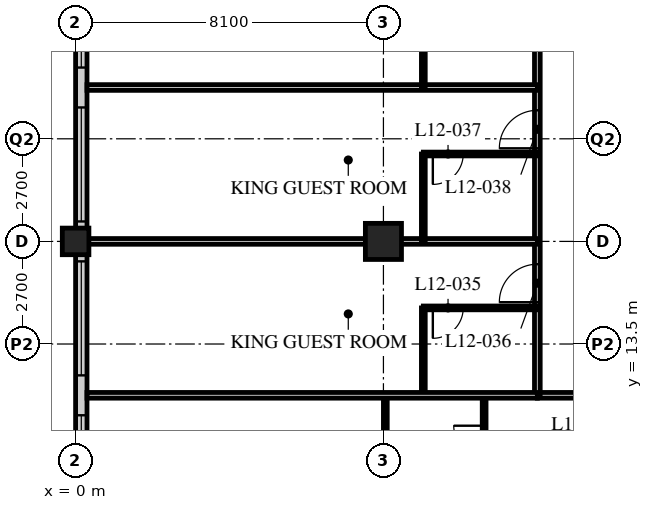
"""IFC4 building model, lengths in metres.
Left out: names, types, materials, properties, quantities, classifications, styles, units other than length and angle.
Written with IfcOpenShell. Run it as: python <this file> out.ifc"""

import sys

from ifc_helpers import new_model, si_unit, direction, frame, frame_2d, origin, origin_2d, place, context, subcontext, project, spatial, rectangle, hollow_rectangle, extrude, element, fill, save


model = new_model("IFC4")
c1 = context("Model", 3, precision=1e-05, world=origin(), true_north=direction((0.0, 1.0)))
c2 = subcontext(c1, "Body", "Model", "MODEL_VIEW")
j1 = project(units=[si_unit("LENGTHUNIT", "METRE"), si_unit("PLANEANGLEUNIT", "RADIAN")], contexts=[c1])
p1 = place(None, origin())
s1 = spatial("IfcSite", under=j1, at=p1, CompositionType="ELEMENT")
p2 = place(p1, origin())
s2 = spatial("IfcBuilding", under=s1, at=p2, CompositionType="ELEMENT")
p3 = place(p2, frame((0.0, 0.0, 53.4)))
s3 = spatial("IfcBuildingStorey", under=s2, at=p3, CompositionType="ELEMENT", Elevation=53.4)
p4 = place(p3, frame((0.0, 16.2, 0.0), z_axis=(0.0, 0.0, 1.0), x_axis=(1.0, 0.0, 0.0)))
e1 = element("IfcColumn", 1, at=p4, inside=s3, PredefinedType="COLUMN", context=c2, shape_type="SweptSolid", body=[
    extrude(hollow_rectangle(XDim=0.7, YDim=0.7, WallThickness=0.06, at=origin_2d()), origin(), (0.0, 0.0, 1.0), 3.4),
])
p5 = place(p3, frame((8.1, 16.2, 0.0), z_axis=(0.0, 0.0, 1.0), x_axis=(1.0, 0.0, 0.0)))
e2 = element("IfcColumn", 2, at=p5, inside=s3, PredefinedType="COLUMN", context=c2, shape_type="SweptSolid", body=[
    extrude(hollow_rectangle(XDim=0.95, YDim=0.95, WallThickness=0.095, at=origin_2d()), origin(), (0.0, 0.0, 1.0), 3.4),
])
p6 = place(p3, frame((0.15, 40.2, 0.0), z_axis=(0.0, 0.0, 1.0), x_axis=(0.0, -1.0, 0.0)))
e3 = element("IfcWall", 3, at=p6, inside=s3, PredefinedType="SOLIDWALL", context=c2, shape_type="SweptSolid", body=[
    extrude(rectangle(XDim=32.1, YDim=0.3, at=frame_2d((16.05, 0.0))), origin(), (0.0, 0.0, 1.0), 3.19),
])
p7 = place(p6, frame((0.225, 0.0, 0.9)))
e4 = element("IfcOpeningElement", 4, at=p7, cuts=e3, PredefinedType="OPENING", context=c2, shape_type="SweptSolid", body=[
    extrude(rectangle(XDim=3.0, YDim=2.0, at=frame_2d((1.5, 1.0))), frame((0.0, 0.16, 0.0), z_axis=(0.0, -1.0, 0.0), x_axis=(1.0, 0.0, 0.0)), (0.0, 0.0, 1.0), 0.32),
])
p8 = place(p6, frame((4.275, 0.0, 0.9)))
e5 = element("IfcOpeningElement", 5, at=p8, cuts=e3, PredefinedType="OPENING", context=c2, shape_type="SweptSolid", body=[
    extrude(rectangle(XDim=3.0, YDim=2.0, at=frame_2d((1.5, 1.0))), frame((0.0, 0.16, 0.0), z_axis=(0.0, -1.0, 0.0), x_axis=(1.0, 0.0, 0.0)), (0.0, 0.0, 1.0), 0.32),
])
p9 = place(p6, frame((8.325, 0.0, 0.9)))
e6 = element("IfcOpeningElement", 6, at=p9, cuts=e3, PredefinedType="OPENING", context=c2, shape_type="SweptSolid", body=[
    extrude(rectangle(XDim=3.0, YDim=2.0, at=frame_2d((1.5, 1.0))), frame((0.0, 0.16, 0.0), z_axis=(0.0, -1.0, 0.0), x_axis=(1.0, 0.0, 0.0)), (0.0, 0.0, 1.0), 0.32),
])
p10 = place(p6, frame((12.375, 0.0, 0.9)))
e7 = element("IfcOpeningElement", 7, at=p10, cuts=e3, PredefinedType="OPENING", context=c2, shape_type="SweptSolid", body=[
    extrude(rectangle(XDim=3.0, YDim=2.0, at=frame_2d((1.5, 1.0))), frame((0.0, 0.16, 0.0), z_axis=(0.0, -1.0, 0.0), x_axis=(1.0, 0.0, 0.0)), (0.0, 0.0, 1.0), 0.32),
])
p11 = place(p6, frame((16.425, 0.0, 0.9)))
e8 = element("IfcOpeningElement", 8, at=p11, cuts=e3, PredefinedType="OPENING", context=c2, shape_type="SweptSolid", body=[
    extrude(rectangle(XDim=3.0, YDim=2.0, at=frame_2d((1.5, 1.0))), frame((0.0, 0.16, 0.0), z_axis=(0.0, -1.0, 0.0), x_axis=(1.0, 0.0, 0.0)), (0.0, 0.0, 1.0), 0.32),
])
p12 = place(p6, frame((20.475, 0.0, 0.9)))
e9 = element("IfcOpeningElement", 9, at=p12, cuts=e3, PredefinedType="OPENING", context=c2, shape_type="SweptSolid", body=[
    extrude(rectangle(XDim=3.0, YDim=2.0, at=frame_2d((1.5, 1.0))), frame((0.0, 0.16, 0.0), z_axis=(0.0, -1.0, 0.0), x_axis=(1.0, 0.0, 0.0)), (0.0, 0.0, 1.0), 0.32),
])
p13 = place(p6, frame((24.525, 0.0, 0.9)))
e10 = element("IfcOpeningElement", 10, at=p13, cuts=e3, PredefinedType="OPENING", context=c2, shape_type="SweptSolid", body=[
    extrude(rectangle(XDim=3.0, YDim=2.0, at=frame_2d((1.5, 1.0))), frame((0.0, 0.16, 0.0), z_axis=(0.0, -1.0, 0.0), x_axis=(1.0, 0.0, 0.0)), (0.0, 0.0, 1.0), 0.32),
])
p14 = place(p6, frame((28.575, 0.0, 0.9)))
e11 = element("IfcOpeningElement", 11, at=p14, cuts=e3, PredefinedType="OPENING", context=c2, shape_type="SweptSolid", body=[
    extrude(rectangle(XDim=3.0, YDim=2.0, at=frame_2d((1.5, 1.0))), frame((0.0, 0.16, 0.0), z_axis=(0.0, -1.0, 0.0), x_axis=(1.0, 0.0, 0.0)), (0.0, 0.0, 1.0), 0.32),
])
p15 = place(p3, frame((12.15, 12.15, 0.0), z_axis=(0.0, 0.0, 1.0), x_axis=(1.0, 0.0, 0.0)))
e12 = element("IfcWall", 12, at=p15, inside=s3, PredefinedType="PARTITIONING", context=c2, shape_type="SweptSolid", body=[
    extrude(rectangle(XDim=32.4, YDim=0.15, at=frame_2d((16.2, 0.0))), origin(), (0.0, 0.0, 1.0), 3.19),
])
p16 = place(p15, frame((6.5, 0.0, 0.0)))
e13 = element("IfcOpeningElement", 13, at=p16, cuts=e12, PredefinedType="OPENING", context=c2, shape_type="SweptSolid", body=[
    extrude(rectangle(XDim=1.0, YDim=2.1, at=frame_2d((0.5, 1.05))), frame((0.0, 0.085, 0.0), z_axis=(0.0, -1.0, 0.0), x_axis=(1.0, 0.0, 0.0)), (0.0, 0.0, 1.0), 0.17),
])
p17 = place(p15, frame((8.4, 0.0, 0.0)))
e14 = element("IfcOpeningElement", 14, at=p17, cuts=e12, PredefinedType="OPENING", context=c2, shape_type="SweptSolid", body=[
    extrude(rectangle(XDim=1.0, YDim=2.1, at=frame_2d((0.5, 1.05))), frame((0.0, 0.085, 0.0), z_axis=(0.0, -1.0, 0.0), x_axis=(1.0, 0.0, 0.0)), (0.0, 0.0, 1.0), 0.17),
])
p18 = place(p15, frame((14.6, 0.0, 0.0)))
e15 = element("IfcOpeningElement", 15, at=p18, cuts=e12, PredefinedType="OPENING", context=c2, shape_type="SweptSolid", body=[
    extrude(rectangle(XDim=1.0, YDim=2.1, at=frame_2d((0.5, 1.05))), frame((0.0, 0.085, 0.0), z_axis=(0.0, -1.0, 0.0), x_axis=(1.0, 0.0, 0.0)), (0.0, 0.0, 1.0), 0.17),
])
p19 = place(p15, frame((18.65, 0.0, 0.0)))
e16 = element("IfcOpeningElement", 16, at=p19, cuts=e12, PredefinedType="OPENING", context=c2, shape_type="SweptSolid", body=[
    extrude(rectangle(XDim=1.0, YDim=2.1, at=frame_2d((0.5, 1.05))), frame((0.0, 0.085, 0.0), z_axis=(0.0, -1.0, 0.0), x_axis=(1.0, 0.0, 0.0)), (0.0, 0.0, 1.0), 0.17),
])
p20 = place(p15, frame((20.55, 0.0, 0.0)))
e17 = element("IfcOpeningElement", 17, at=p20, cuts=e12, PredefinedType="OPENING", context=c2, shape_type="SweptSolid", body=[
    extrude(rectangle(XDim=1.0, YDim=2.1, at=frame_2d((0.5, 1.05))), frame((0.0, 0.085, 0.0), z_axis=(0.0, -1.0, 0.0), x_axis=(1.0, 0.0, 0.0)), (0.0, 0.0, 1.0), 0.17),
])
p21 = place(p15, frame((26.75, 0.0, 0.0)))
e18 = element("IfcOpeningElement", 18, at=p21, cuts=e12, PredefinedType="OPENING", context=c2, shape_type="SweptSolid", body=[
    extrude(rectangle(XDim=1.0, YDim=2.1, at=frame_2d((0.5, 1.05))), frame((0.0, 0.085, 0.0), z_axis=(0.0, -1.0, 0.0), x_axis=(1.0, 0.0, 0.0)), (0.0, 0.0, 1.0), 0.17),
])
p22 = place(p15, frame((1.525, 0.0, 0.0)))
e19 = element("IfcOpeningElement", 19, at=p22, cuts=e12, PredefinedType="OPENING", context=c2, shape_type="SweptSolid", body=[
    extrude(rectangle(XDim=1.0, YDim=2.1, at=frame_2d((0.5, 1.05))), frame((0.0, 0.085, 0.0), z_axis=(0.0, -1.0, 0.0), x_axis=(1.0, 0.0, 0.0)), (0.0, 0.0, 1.0), 0.17),
])
p23 = place(p15, frame((29.875, 0.0, 0.0)))
e20 = element("IfcOpeningElement", 20, at=p23, cuts=e12, PredefinedType="OPENING", context=c2, shape_type="SweptSolid", body=[
    extrude(rectangle(XDim=1.0, YDim=2.1, at=frame_2d((0.5, 1.05))), frame((0.0, 0.085, 0.0), z_axis=(0.0, -1.0, 0.0), x_axis=(1.0, 0.0, 0.0)), (0.0, 0.0, 1.0), 0.17),
])
p24 = place(p3, frame((12.15, 12.15, 0.0), z_axis=(0.0, 0.0, 1.0), x_axis=(0.0, 1.0, 0.0)))
e21 = element("IfcWall", 21, at=p24, inside=s3, PredefinedType="PARTITIONING", context=c2, shape_type="SweptSolid", body=[
    extrude(rectangle(XDim=30.15, YDim=0.15, at=frame_2d((15.075, 0.0))), origin(), (0.0, 0.0, 1.0), 3.19),
])
p25 = place(p24, frame((2.45, 0.0, 0.0)))
e22 = element("IfcOpeningElement", 22, at=p25, cuts=e21, PredefinedType="OPENING", context=c2, shape_type="SweptSolid", body=[
    extrude(rectangle(XDim=1.0, YDim=2.1, at=frame_2d((0.5, 1.05))), frame((0.0, 0.085, 0.0), z_axis=(0.0, -1.0, 0.0), x_axis=(1.0, 0.0, 0.0)), (0.0, 0.0, 1.0), 0.17),
])
p26 = place(p24, frame((6.5, 0.0, 0.0)))
e23 = element("IfcOpeningElement", 23, at=p26, cuts=e21, PredefinedType="OPENING", context=c2, shape_type="SweptSolid", body=[
    extrude(rectangle(XDim=1.0, YDim=2.1, at=frame_2d((0.5, 1.05))), frame((0.0, 0.085, 0.0), z_axis=(0.0, -1.0, 0.0), x_axis=(1.0, 0.0, 0.0)), (0.0, 0.0, 1.0), 0.17),
])
p27 = place(p24, frame((10.55, 0.0, 0.0)))
e24 = element("IfcOpeningElement", 24, at=p27, cuts=e21, PredefinedType="OPENING", context=c2, shape_type="SweptSolid", body=[
    extrude(rectangle(XDim=1.0, YDim=2.1, at=frame_2d((0.5, 1.05))), frame((0.0, 0.085, 0.0), z_axis=(0.0, -1.0, 0.0), x_axis=(1.0, 0.0, 0.0)), (0.0, 0.0, 1.0), 0.17),
])
p28 = place(p24, frame((14.6, 0.0, 0.0)))
e25 = element("IfcOpeningElement", 25, at=p28, cuts=e21, PredefinedType="OPENING", context=c2, shape_type="SweptSolid", body=[
    extrude(rectangle(XDim=1.0, YDim=2.1, at=frame_2d((0.5, 1.05))), frame((0.0, 0.085, 0.0), z_axis=(0.0, -1.0, 0.0), x_axis=(1.0, 0.0, 0.0)), (0.0, 0.0, 1.0), 0.17),
])
p29 = place(p24, frame((21.65, 0.0, 0.0)))
e26 = element("IfcOpeningElement", 26, at=p29, cuts=e21, PredefinedType="OPENING", context=c2, shape_type="SweptSolid", body=[
    extrude(rectangle(XDim=1.0, YDim=2.1, at=frame_2d((0.5, 1.05))), frame((0.0, 0.085, 0.0), z_axis=(0.0, -1.0, 0.0), x_axis=(1.0, 0.0, 0.0)), (0.0, 0.0, 1.0), 0.17),
])
p30 = place(p24, frame((26.7, 0.0, 0.0)))
e27 = element("IfcOpeningElement", 27, at=p30, cuts=e21, PredefinedType="OPENING", context=c2, shape_type="SweptSolid", body=[
    extrude(rectangle(XDim=1.0, YDim=2.1, at=frame_2d((0.5, 1.05))), frame((0.0, 0.085, 0.0), z_axis=(0.0, -1.0, 0.0), x_axis=(1.0, 0.0, 0.0)), (0.0, 0.0, 1.0), 0.17),
])
p31 = place(p3, frame((9.15, 12.15, 0.0), z_axis=(0.0, 0.0, 1.0), x_axis=(0.0, 1.0, 0.0)))
e28 = element("IfcWall", 28, at=p31, inside=s3, PredefinedType="PARTITIONING", context=c2, shape_type="SweptSolid", body=[
    extrude(rectangle(XDim=2.3, YDim=0.1, at=frame_2d((1.15, 0.0))), origin(), (0.0, 0.0, 1.0), 3.19),
])
p32 = place(p3, frame((12.15, 14.45, 0.0), z_axis=(0.0, 0.0, 1.0), x_axis=(-1.0, 0.0, 0.0)))
e29 = element("IfcWall", 29, at=p32, inside=s3, PredefinedType="PARTITIONING", context=c2, shape_type="SweptSolid", body=[
    extrude(rectangle(XDim=3.0, YDim=0.1, at=frame_2d((1.5, 0.0))), origin(), (0.0, 0.0, 1.0), 3.19),
])
p33 = place(p32, frame((1.95, 0.0, 0.0)))
e30 = element("IfcOpeningElement", 30, at=p33, cuts=e29, PredefinedType="OPENING", context=c2, shape_type="SweptSolid", body=[
    extrude(rectangle(XDim=0.8, YDim=2.1, at=frame_2d((0.4, 1.05))), frame((0.0, 0.06, 0.0), z_axis=(0.0, -1.0, 0.0), x_axis=(1.0, 0.0, 0.0)), (0.0, 0.0, 1.0), 0.12),
])
p34 = place(p3, frame((12.15, 16.2, 0.0), z_axis=(0.0, 0.0, 1.0), x_axis=(-1.0, 0.0, 0.0)))
e31 = element("IfcWall", 31, at=p34, inside=s3, PredefinedType="PARTITIONING", context=c2, shape_type="SweptSolid", body=[
    extrude(rectangle(XDim=11.85, YDim=0.15, at=frame_2d((5.925, 0.0))), origin(), (0.0, 0.0, 1.0), 2.578),
])
p35 = place(p3, frame((9.15, 16.2, 0.0), z_axis=(0.0, 0.0, 1.0), x_axis=(0.0, 1.0, 0.0)))
e32 = element("IfcWall", 32, at=p35, inside=s3, PredefinedType="PARTITIONING", context=c2, shape_type="SweptSolid", body=[
    extrude(rectangle(XDim=2.3, YDim=0.1, at=frame_2d((1.15, 0.0))), origin(), (0.0, 0.0, 1.0), 3.19),
])
p36 = place(p3, frame((12.15, 18.5, 0.0), z_axis=(0.0, 0.0, 1.0), x_axis=(-1.0, 0.0, 0.0)))
e33 = element("IfcWall", 33, at=p36, inside=s3, PredefinedType="PARTITIONING", context=c2, shape_type="SweptSolid", body=[
    extrude(rectangle(XDim=3.0, YDim=0.1, at=frame_2d((1.5, 0.0))), origin(), (0.0, 0.0, 1.0), 3.19),
])
p37 = place(p36, frame((1.95, 0.0, 0.0)))
e34 = element("IfcOpeningElement", 34, at=p37, cuts=e33, PredefinedType="OPENING", context=c2, shape_type="SweptSolid", body=[
    extrude(rectangle(XDim=0.8, YDim=2.1, at=frame_2d((0.4, 1.05))), frame((0.0, 0.06, 0.0), z_axis=(0.0, -1.0, 0.0), x_axis=(1.0, 0.0, 0.0)), (0.0, 0.0, 1.0), 0.12),
])
p38 = place(p3, frame((12.15, 20.25, 0.0), z_axis=(0.0, 0.0, 1.0), x_axis=(-1.0, 0.0, 0.0)))
e35 = element("IfcWall", 35, at=p38, inside=s3, PredefinedType="PARTITIONING", context=c2, shape_type="SweptSolid", body=[
    extrude(rectangle(XDim=11.85, YDim=0.15, at=frame_2d((5.925, 0.0))), origin(), (0.0, 0.0, 1.0), 3.19),
])
p39 = place(p3, frame((9.15, 20.25, 0.0), z_axis=(0.0, 0.0, 1.0), x_axis=(0.0, 1.0, 0.0)))
e36 = element("IfcWall", 36, at=p39, inside=s3, PredefinedType="PARTITIONING", context=c2, shape_type="SweptSolid", body=[
    extrude(rectangle(XDim=2.3, YDim=0.1, at=frame_2d((1.15, 0.0))), origin(), (0.0, 0.0, 1.0), 3.19),
])
p40 = place(p3, frame((10.75, 12.15, 0.0), z_axis=(0.0, 0.0, 1.0), x_axis=(0.0, -1.0, 0.0)))
e37 = element("IfcWall", 37, at=p40, inside=s3, PredefinedType="PARTITIONING", context=c2, shape_type="SweptSolid", body=[
    extrude(rectangle(XDim=2.4, YDim=0.1, at=frame_2d((1.2, 0.0))), origin(), (0.0, 0.0, 1.0), 3.19),
])
p41 = place(p40, frame((0.8, 0.0, 0.0)))
e38 = element("IfcOpeningElement", 38, at=p41, cuts=e37, PredefinedType="OPENING", context=c2, shape_type="SweptSolid", body=[
    extrude(rectangle(XDim=0.8, YDim=2.1, at=frame_2d((0.4, 1.05))), frame((0.0, 0.06, 0.0), z_axis=(0.0, -1.0, 0.0), x_axis=(1.0, 0.0, 0.0)), (0.0, 0.0, 1.0), 0.12),
])
p42 = place(p3, frame((8.15, 12.15, 0.0), z_axis=(0.0, 0.0, 1.0), x_axis=(0.0, -1.0, 0.0)))
e39 = element("IfcWall", 39, at=p42, inside=s3, PredefinedType="PARTITIONING", context=c2, shape_type="SweptSolid", body=[
    extrude(rectangle(XDim=2.4, YDim=0.1, at=frame_2d((1.2, 0.0))), origin(), (0.0, 0.0, 1.0), 2.578),
])
p43 = place(p3, frame((0.3, 12.15, 0.0), z_axis=(0.0, 0.0, 1.0), x_axis=(1.0, 0.0, 0.0)))
e40 = element("IfcWall", 40, at=p43, inside=s3, PredefinedType="PARTITIONING", context=c2, shape_type="SweptSolid", body=[
    extrude(rectangle(XDim=11.85, YDim=0.15, at=frame_2d((5.925, 0.0))), origin(), (0.0, 0.0, 1.0), 3.19),
])
p44 = place(p11, origin())
e41 = element("IfcWindow", 41, at=p44, inside=s3, PartitioningType="SINGLE_PANEL", PredefinedType="WINDOW", context=c2, shape_type="SweptSolid", body=[
    extrude(rectangle(XDim=3.0, YDim=2.0, at=frame_2d((1.5, 1.0))), frame((0.0, 0.03, 0.0), z_axis=(0.0, -1.0, 0.0), x_axis=(1.0, 0.0, 0.0)), (0.0, 0.0, 1.0), 0.06),
])
fill(e8, e41)
p45 = place(p12, origin())
e42 = element("IfcWindow", 42, at=p45, inside=s3, PartitioningType="SINGLE_PANEL", PredefinedType="WINDOW", context=c2, shape_type="SweptSolid", body=[
    extrude(rectangle(XDim=3.0, YDim=2.0, at=frame_2d((1.5, 1.0))), frame((0.0, 0.03, 0.0), z_axis=(0.0, -1.0, 0.0), x_axis=(1.0, 0.0, 0.0)), (0.0, 0.0, 1.0), 0.06),
])
fill(e9, e42)
p46 = place(p13, origin())
e43 = element("IfcWindow", 43, at=p46, inside=s3, PartitioningType="SINGLE_PANEL", PredefinedType="WINDOW", context=c2, shape_type="SweptSolid", body=[
    extrude(rectangle(XDim=3.0, YDim=2.0, at=frame_2d((1.5, 1.0))), frame((0.0, 0.03, 0.0), z_axis=(0.0, -1.0, 0.0), x_axis=(1.0, 0.0, 0.0)), (0.0, 0.0, 1.0), 0.06),
])
fill(e10, e43)
p47 = place(p14, origin())
e44 = element("IfcWindow", 44, at=p47, inside=s3, PartitioningType="SINGLE_PANEL", PredefinedType="WINDOW", context=c2, shape_type="SweptSolid", body=[
    extrude(rectangle(XDim=3.0, YDim=2.0, at=frame_2d((1.5, 1.0))), frame((0.0, 0.03, 0.0), z_axis=(0.0, -1.0, 0.0), x_axis=(1.0, 0.0, 0.0)), (0.0, 0.0, 1.0), 0.06),
])
fill(e11, e44)
p48 = place(p33, origin())
e45 = element("IfcDoor", 45, at=p48, inside=s3, OperationType="SINGLE_SWING_RIGHT", PredefinedType="DOOR", context=c2, shape_type="SweptSolid", body=[
    extrude(rectangle(XDim=0.8, YDim=2.1, at=frame_2d((0.4, 1.05))), frame((0.0, 0.025, 0.0), z_axis=(0.0, -1.0, 0.0), x_axis=(1.0, 0.0, 0.0)), (0.0, 0.0, 1.0), 0.05),
])
fill(e30, e45)
p49 = place(p25, origin())
e46 = element("IfcDoor", 46, at=p49, inside=s3, OperationType="SINGLE_SWING_LEFT", PredefinedType="DOOR", context=c2, shape_type="SweptSolid", body=[
    extrude(rectangle(XDim=1.0, YDim=2.1, at=frame_2d((0.5, 1.05))), frame((0.0, 0.025, 0.0), z_axis=(0.0, -1.0, 0.0), x_axis=(1.0, 0.0, 0.0)), (0.0, 0.0, 1.0), 0.05),
])
fill(e22, e46)
p50 = place(p37, origin())
e47 = element("IfcDoor", 47, at=p50, inside=s3, OperationType="SINGLE_SWING_RIGHT", PredefinedType="DOOR", context=c2, shape_type="SweptSolid", body=[
    extrude(rectangle(XDim=0.8, YDim=2.1, at=frame_2d((0.4, 1.05))), frame((0.0, 0.025, 0.0), z_axis=(0.0, -1.0, 0.0), x_axis=(1.0, 0.0, 0.0)), (0.0, 0.0, 1.0), 0.05),
])
fill(e34, e47)
p51 = place(p26, origin())
e48 = element("IfcDoor", 48, at=p51, inside=s3, OperationType="SINGLE_SWING_LEFT", PredefinedType="DOOR", context=c2, shape_type="SweptSolid", body=[
    extrude(rectangle(XDim=1.0, YDim=2.1, at=frame_2d((0.5, 1.05))), frame((0.0, 0.025, 0.0), z_axis=(0.0, -1.0, 0.0), x_axis=(1.0, 0.0, 0.0)), (0.0, 0.0, 1.0), 0.05),
])
fill(e23, e48)
p52 = place(p41, origin())
e49 = element("IfcDoor", 49, at=p52, inside=s3, OperationType="SINGLE_SWING_RIGHT", PredefinedType="DOOR", context=c2, shape_type="SweptSolid", body=[
    extrude(rectangle(XDim=0.8, YDim=2.1, at=frame_2d((0.4, 1.05))), frame((0.0, 0.025, 0.0), z_axis=(0.0, -1.0, 0.0), x_axis=(1.0, 0.0, 0.0)), (0.0, 0.0, 1.0), 0.05),
])
fill(e38, e49)
save(model, sys.argv[1])
